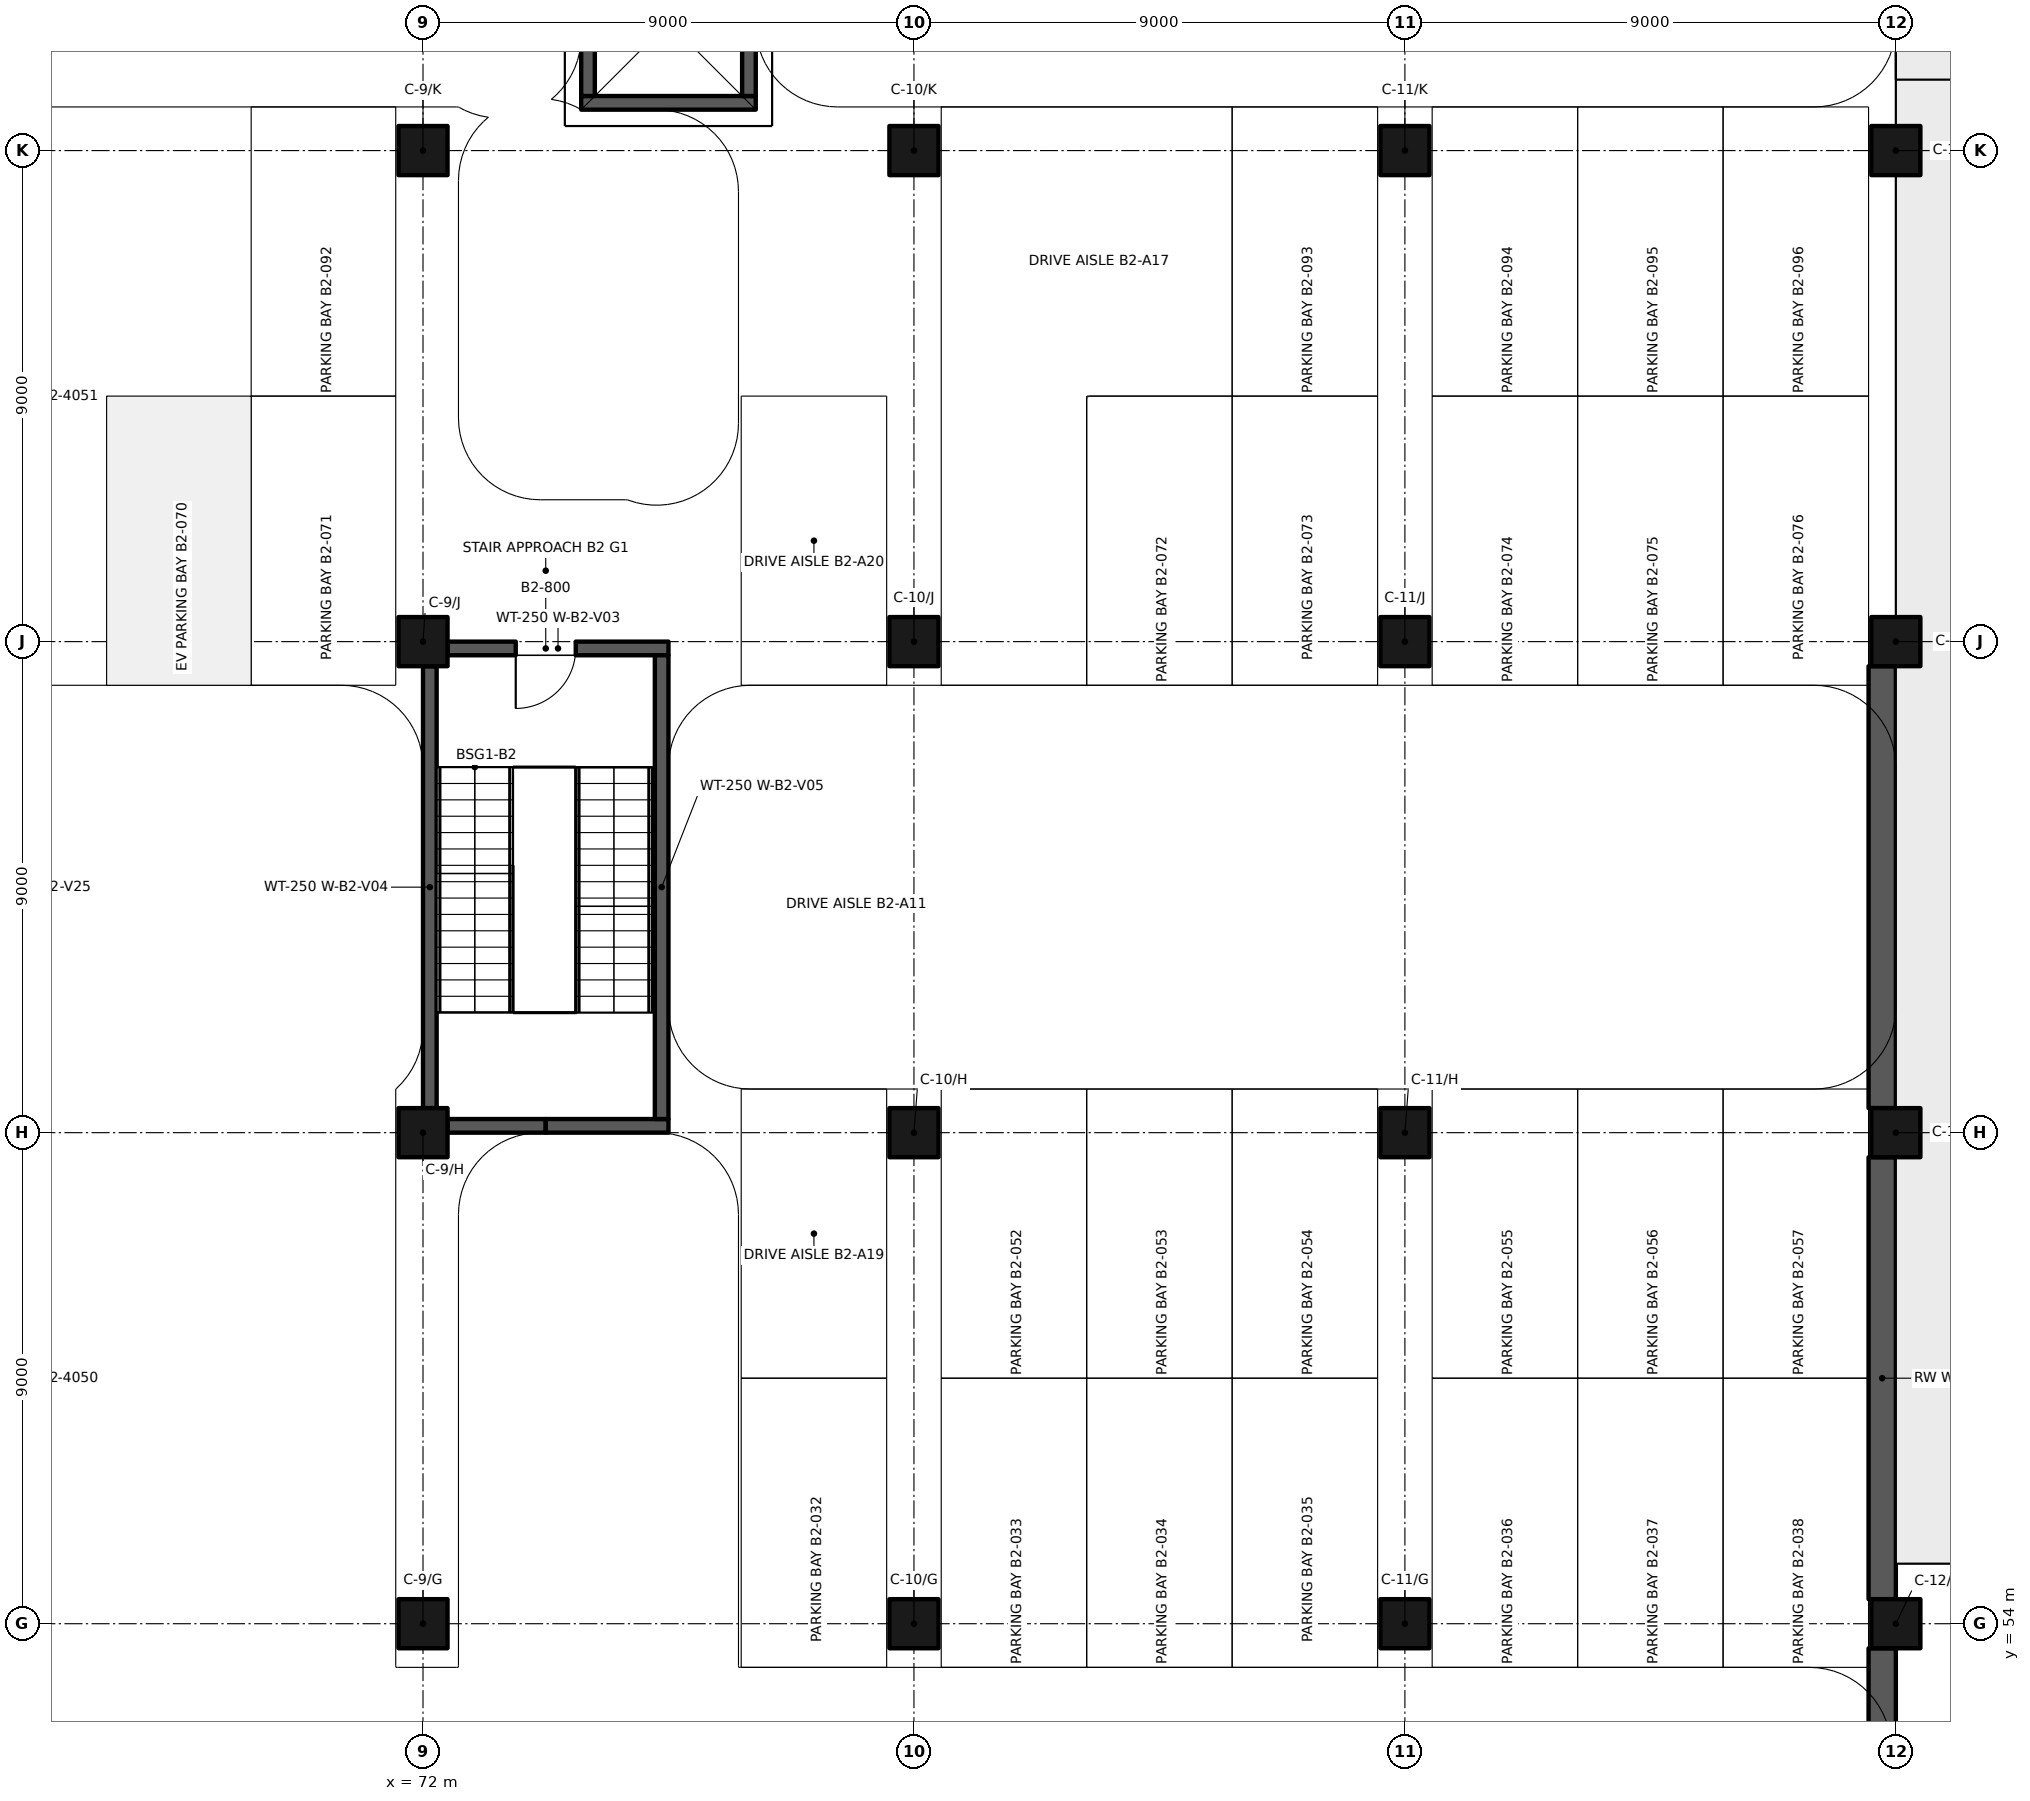
"""IFC4 building model, lengths in metres.
Left out: names, types, materials, properties, quantities, classifications, styles, units other than length and angle.
Written with IfcOpenShell. Run it as: python <this file> out.ifc"""

import sys

from ifc_helpers import new_model, si_unit, direction, frame, frame_2d, origin, origin_2d, place, context, subcontext, project, spatial, rectangle, extrude, element, fill, save


model = new_model("IFC4")
c1 = context("Model", 3, precision=1e-05, world=origin(), true_north=direction((0.0, 1.0)))
c2 = subcontext(c1, "Body", "Model", "MODEL_VIEW")
j1 = project(units=[si_unit("LENGTHUNIT", "METRE"), si_unit("PLANEANGLEUNIT", "RADIAN")], contexts=[c1])
p1 = place(None, origin())
s1 = spatial("IfcSite", under=j1, at=p1, CompositionType="ELEMENT")
p2 = place(p1, origin())
s2 = spatial("IfcBuilding", under=s1, at=p2, CompositionType="ELEMENT")
p3 = place(p2, frame((0.0, 0.0, -9.9)))
s3 = spatial("IfcBuildingStorey", under=s2, at=p3, CompositionType="ELEMENT", Elevation=-9.9)
p4 = place(p3, frame((98.75, 51.5, -0.5), z_axis=(0.0, 0.0, 1.0), x_axis=(0.0, 1.0, 0.0)))
e1 = element("IfcWall", 1, at=p4, inside=s3, PredefinedType="SOLIDWALL", context=c2, shape_type="SweptSolid", body=[
    extrude(rectangle(XDim=2.05, YDim=0.5, at=frame_2d((1.025, 0.0))), origin(), (0.0, 0.0, 1.0), 5.3),
])
for number, where, z_axis, x_axis in (
    (2, (98.75, 54.45, -0.5), (0.0, 0.0, 1.0), (0.0, 1.0, 0.0)),
    (3, (98.75, 63.45, -0.5), (0.0, 0.0, 1.0), (0.0, 1.0, 0.0)),
):
    element("IfcWall", number, at=place(p3, frame(where, z_axis=z_axis, x_axis=x_axis)), inside=s3, PredefinedType="SOLIDWALL", context=c2, shape_type="SweptSolid", body=[
        extrude(rectangle(XDim=8.1, YDim=0.5, at=frame_2d((4.05, 0.0))), origin(), (0.0, 0.0, 1.0), 5.3),
    ])
for number, where, z_axis, x_axis in (
    (4, (72.0, 54.0, 0.0), (0.0, 0.0, 1.0), (1.0, 0.0, 0.0)),
    (5, (81.0, 54.0, 0.0), (0.0, 0.0, 1.0), (1.0, 0.0, 0.0)),
    (6, (90.0, 54.0, 0.0), (0.0, 0.0, 1.0), (1.0, 0.0, 0.0)),
    (7, (99.0, 54.0, 0.0), (0.0, 0.0, 1.0), (1.0, 0.0, 0.0)),
    (8, (72.0, 63.0, 0.0), (0.0, 0.0, 1.0), (1.0, 0.0, 0.0)),
    (9, (81.0, 63.0, 0.0), (0.0, 0.0, 1.0), (1.0, 0.0, 0.0)),
    (10, (90.0, 63.0, 0.0), (0.0, 0.0, 1.0), (1.0, 0.0, 0.0)),
    (11, (99.0, 63.0, 0.0), (0.0, 0.0, 1.0), (1.0, 0.0, 0.0)),
    (12, (72.0, 72.0, 0.0), (0.0, 0.0, 1.0), (1.0, 0.0, 0.0)),
    (13, (81.0, 72.0, 0.0), (0.0, 0.0, 1.0), (1.0, 0.0, 0.0)),
    (14, (90.0, 72.0, 0.0), (0.0, 0.0, 1.0), (1.0, 0.0, 0.0)),
    (15, (99.0, 72.0, 0.0), (0.0, 0.0, 1.0), (1.0, 0.0, 0.0)),
    (16, (72.0, 81.0, 0.0), (0.0, 0.0, 1.0), (1.0, 0.0, 0.0)),
    (17, (81.0, 81.0, 0.0), (0.0, 0.0, 1.0), (1.0, 0.0, 0.0)),
    (18, (90.0, 81.0, 0.0), (0.0, 0.0, 1.0), (1.0, 0.0, 0.0)),
    (19, (99.0, 81.0, 0.0), (0.0, 0.0, 1.0), (1.0, 0.0, 0.0)),
):
    element("IfcColumn", number, at=place(p3, frame(where, z_axis=z_axis, x_axis=x_axis)), inside=s3, PredefinedType="COLUMN", context=c2, shape_type="SweptSolid", body=[
        extrude(rectangle(XDim=0.9, YDim=0.9, at=origin_2d()), origin(), (0.0, 0.0, 1.0), 4.8),
    ])
p5 = place(p3, frame((72.45, 63.125, 0.0), z_axis=(0.0, 0.0, 1.0), x_axis=(1.0, 0.0, 0.0)))
e20 = element("IfcWall", 20, at=p5, inside=s3, PredefinedType="SHEAR", context=c2, shape_type="SweptSolid", body=[
    extrude(rectangle(XDim=1.8, YDim=0.25, at=frame_2d((0.9, 0.0))), origin(), (0.0, 0.0, 1.0), 4.8),
])
p6 = place(p3, frame((74.25, 63.125, 0.0), z_axis=(0.0, 0.0, 1.0), x_axis=(1.0, 0.0, 0.0)))
e21 = element("IfcWall", 21, at=p6, inside=s3, PredefinedType="SHEAR", context=c2, shape_type="SweptSolid", body=[
    extrude(rectangle(XDim=2.25, YDim=0.25, at=frame_2d((1.125, 0.0))), origin(), (0.0, 0.0, 1.0), 4.8),
])
p7 = place(p3, frame((72.45, 71.875, 0.0), z_axis=(0.0, 0.0, 1.0), x_axis=(1.0, 0.0, 0.0)))
e22 = element("IfcWall", 22, at=p7, inside=s3, PredefinedType="SHEAR", context=c2, shape_type="SweptSolid", body=[
    extrude(rectangle(XDim=4.05, YDim=0.25, at=frame_2d((2.025, 0.0))), origin(), (0.0, 0.0, 1.0), 4.8),
])
p8 = place(p7, frame((2.35, 0.0, 0.0), z_axis=(0.0, 0.0, 1.0), x_axis=(-1.0, 0.0, 0.0)))
e23 = element("IfcOpeningElement", 23, at=p8, cuts=e22, PredefinedType="OPENING", context=c2, shape_type="SweptSolid", body=[
    extrude(rectangle(XDim=1.1, YDim=2.1, at=frame_2d((0.55, 1.05))), frame((0.0, 0.135, 0.0), z_axis=(0.0, -1.0, 0.0), x_axis=(1.0, 0.0, 0.0)), (0.0, 0.0, 1.0), 0.27),
])
p9 = place(p3, frame((72.125, 63.45, 0.0), z_axis=(0.0, 0.0, 1.0), x_axis=(0.0, 1.0, 0.0)))
e24 = element("IfcWall", 24, at=p9, inside=s3, PredefinedType="SHEAR", context=c2, shape_type="SweptSolid", body=[
    extrude(rectangle(XDim=8.1, YDim=0.25, at=frame_2d((4.05, 0.0))), origin(), (0.0, 0.0, 1.0), 4.8),
])
p10 = place(p3, frame((76.375, 63.25, 0.0), z_axis=(0.0, 0.0, 1.0), x_axis=(0.0, 1.0, 0.0)))
e25 = element("IfcWall", 25, at=p10, inside=s3, PredefinedType="SHEAR", context=c2, shape_type="SweptSolid", body=[
    extrude(rectangle(XDim=8.5, YDim=0.25, at=frame_2d((4.25, 0.0))), origin(), (0.0, 0.0, 1.0), 4.8),
])
p11 = place(p3, frame((74.9, 81.875, -1.6), z_axis=(0.0, 0.0, 1.0), x_axis=(1.0, 0.0, 0.0)))
e26 = element("IfcWall", 26, at=p11, inside=s3, PredefinedType="SHEAR", context=c2, shape_type="SweptSolid", body=[
    extrude(rectangle(XDim=3.2, YDim=0.25, at=frame_2d((1.6, 0.0))), origin(), (0.0, 0.0, 1.0), 6.4),
])
for number, where, z_axis, x_axis in (
    (27, (75.025, 82.0, -1.6), (0.0, 0.0, 1.0), (0.0, 1.0, 0.0)),
    (28, (77.975, 82.0, -1.6), (0.0, 0.0, 1.0), (0.0, 1.0, 0.0)),
):
    element("IfcWall", number, at=place(p3, frame(where, z_axis=z_axis, x_axis=x_axis)), inside=s3, PredefinedType="SHEAR", context=c2, shape_type="SweptSolid", body=[
        extrude(rectangle(XDim=2.7, YDim=0.25, at=frame_2d((1.35, 0.0))), origin(), (0.0, 0.0, 1.0), 6.4),
    ])
p12 = place(p8, origin())
e29 = element("IfcDoor", 29, at=p12, inside=s3, OperationType="SINGLE_SWING_RIGHT", PredefinedType="DOOR", context=c2, shape_type="SweptSolid", body=[
    extrude(rectangle(XDim=1.1, YDim=2.1, at=frame_2d((0.55, 1.05))), frame((0.0, 0.025, 0.0), z_axis=(0.0, -1.0, 0.0), x_axis=(1.0, 0.0, 0.0)), (0.0, 0.0, 1.0), 0.05),
])
fill(e23, e29)
save(model, sys.argv[1])
